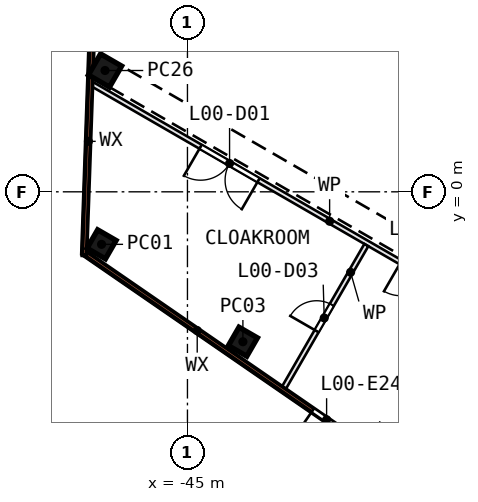
"""IFC4 building model, lengths in metres.
Left out: names, types, materials, properties, quantities, classifications, styles, units other than length and angle.
Written with IfcOpenShell. Run it as: python <this file> out.ifc"""

import sys

from ifc_helpers import new_model, si_unit, direction, frame, frame_2d, origin, origin_2d, place, context, subcontext, project, spatial, rectangle, extrude, element, fill, save


model = new_model("IFC4")
c1 = context("Model", 3, precision=1e-05, world=origin(), true_north=direction((0.0, 1.0)))
c2 = subcontext(c1, "Body", "Model", "MODEL_VIEW")
j1 = project(units=[si_unit("LENGTHUNIT", "METRE"), si_unit("PLANEANGLEUNIT", "RADIAN")], contexts=[c1])
p1 = place(None, origin())
s1 = spatial("IfcSite", under=j1, at=p1, CompositionType="ELEMENT")
p2 = place(p1, origin())
s2 = spatial("IfcBuilding", under=s1, at=p2, CompositionType="ELEMENT")
p3 = place(p2, origin())
s3 = spatial("IfcBuildingStorey", under=s2, at=p3, CompositionType="ELEMENT", Elevation=0.0)
for number, where, z_axis, x_axis in (
    (1, (-47.825, -1.728, 0.0), (0.0, 0.0, 1.0), (-0.866, 0.5, 0.0)),
    (2, (-43.176, -4.931, 0.0), (0.0, 0.0, 1.0), (-0.866, 0.5, 0.0)),
):
    element("IfcColumn", number, at=place(p3, frame(where, z_axis=z_axis, x_axis=x_axis)), inside=s3, PredefinedType="COLUMN", context=c2, shape_type="SweptSolid", body=[
        extrude(rectangle(XDim=0.7, YDim=0.7, at=origin_2d()), origin(), (0.0, 0.0, 1.0), 8.0),
    ])
p4 = place(p3, frame((-47.712, 3.99, 0.0), z_axis=(0.0, 0.0, 1.0), x_axis=(-0.866025404, 0.5, 0.0)))
e3 = element("IfcColumn", 3, at=p4, inside=s3, PredefinedType="COLUMN", context=c2, shape_type="SweptSolid", body=[
    extrude(rectangle(XDim=0.8, YDim=0.8, at=origin_2d()), origin(), (0.0, 0.0, 1.0), 8.0),
])
p5 = place(p3, frame((-48.127, 5.413, 0.0), z_axis=(0.0, 0.0, 1.0), x_axis=(-0.034847415, -0.999392644, 0.0)))
e4 = element("IfcWall", 4, at=p5, inside=s3, PredefinedType="SOLIDWALL", context=c2, shape_type="SweptSolid", body=[
    extrude(rectangle(XDim=7.51, YDim=0.14, at=frame_2d((3.755, 0.0))), origin(), (0.0, 0.0, 1.0), 7.55),
])
p6 = place(p3, frame((-33.989, -11.93, 0.0), z_axis=(0.0, 0.0, 1.0), x_axis=(-0.823449914, 0.567388967, 0.0)))
e5 = element("IfcWall", 5, at=p6, inside=s3, PredefinedType="SOLIDWALL", context=c2, shape_type="SweptSolid", body=[
    extrude(rectangle(XDim=17.4, YDim=0.14, at=frame_2d((8.7, 0.0))), origin(), (0.0, 0.0, 1.0), 7.55),
])
p7 = place(p6, frame((7.264, 0.0, 0.0)))
e6 = element("IfcOpeningElement", 6, at=p7, cuts=e5, PredefinedType="OPENING", context=c2, shape_type="SweptSolid", body=[
    extrude(rectangle(XDim=1.1, YDim=2.4, at=frame_2d((0.55, 1.2))), frame((0.0, 0.08, 0.0), z_axis=(0.0, -1.0, 0.0), x_axis=(1.0, 0.0, 0.0)), (0.0, 0.0, 1.0), 0.16),
])
p8 = place(p6, frame((2.518, 0.0, 0.0)))
e7 = element("IfcOpeningElement", 7, at=p8, cuts=e5, PredefinedType="OPENING", context=c2, shape_type="SweptSolid", body=[
    extrude(rectangle(XDim=1.1, YDim=2.4, at=frame_2d((0.55, 1.2))), frame((0.0, 0.08, 0.0), z_axis=(0.0, -1.0, 0.0), x_axis=(1.0, 0.0, 0.0)), (0.0, 0.0, 1.0), 0.16),
])
p9 = place(p3, frame((-34.814, -4.149, 0.0), z_axis=(0.0, 0.0, 1.0), x_axis=(-0.866027575, 0.499996239, 0.0)))
e8 = element("IfcWall", 8, at=p9, inside=s3, PredefinedType="PARTITIONING", context=c2, shape_type="SweptSolid", body=[
    extrude(rectangle(XDim=15.412, YDim=0.15, at=frame_2d((7.706, 0.0))), origin(), (0.0, 0.0, 1.0), 7.55),
])
p10 = place(p9, frame((9.062, 0.0, 0.0)))
e9 = element("IfcOpeningElement", 9, at=p10, cuts=e8, PredefinedType="OPENING", context=c2, shape_type="SweptSolid", body=[
    extrude(rectangle(XDim=2.2, YDim=2.4, at=frame_2d((1.1, 1.2))), frame((0.0, 0.085, 0.0), z_axis=(0.0, -1.0, 0.0), x_axis=(1.0, 0.0, 0.0)), (0.0, 0.0, 1.0), 0.17),
])
p11 = place(p9, frame((1.462, 0.0, 0.0)))
e10 = element("IfcOpeningElement", 10, at=p11, cuts=e8, PredefinedType="OPENING", context=c2, shape_type="SweptSolid", body=[
    extrude(rectangle(XDim=2.2, YDim=2.4, at=frame_2d((1.1, 1.2))), frame((0.0, 0.085, 0.0), z_axis=(0.0, -1.0, 0.0), x_axis=(1.0, 0.0, 0.0)), (0.0, 0.0, 1.0), 0.17),
])
p12 = place(p3, frame((-41.826, -6.445, 0.0), z_axis=(0.0, 0.0, 1.0), x_axis=(0.50002013, 0.866013781, 0.0)))
e11 = element("IfcWall", 11, at=p12, inside=s3, PredefinedType="PARTITIONING", context=c2, shape_type="SweptSolid", body=[
    extrude(rectangle(XDim=5.419, YDim=0.15, at=frame_2d((2.709, 0.0))), origin(), (0.0, 0.0, 1.0), 7.55),
])
p13 = place(p12, frame((2.15, 0.0, 0.0)))
e12 = element("IfcOpeningElement", 12, at=p13, cuts=e11, PredefinedType="OPENING", context=c2, shape_type="SweptSolid", body=[
    extrude(rectangle(XDim=1.0, YDim=2.1, at=frame_2d((0.5, 1.05))), frame((0.0, 0.085, 0.0), z_axis=(0.0, -1.0, 0.0), x_axis=(1.0, 0.0, 0.0)), (0.0, 0.0, 1.0), 0.17),
])
p14 = place(p7, origin())
e13 = element("IfcDoor", 13, at=p14, inside=s3, OperationType="SINGLE_SWING_RIGHT", PredefinedType="DOOR", context=c2, shape_type="SweptSolid", body=[
    extrude(rectangle(XDim=1.1, YDim=2.4, at=frame_2d((0.55, 1.2))), frame((0.0, 0.025, 0.0), z_axis=(0.0, -1.0, 0.0), x_axis=(1.0, 0.0, 0.0)), (0.0, 0.0, 1.0), 0.05),
])
fill(e6, e13)
p15 = place(p10, origin())
e14 = element("IfcDoor", 14, at=p15, inside=s3, OperationType="DOUBLE_DOOR_SINGLE_SWING", PredefinedType="DOOR", context=c2, shape_type="SweptSolid", body=[
    extrude(rectangle(XDim=2.2, YDim=2.4, at=frame_2d((1.1, 1.2))), frame((0.0, 0.025, 0.0), z_axis=(0.0, -1.0, 0.0), x_axis=(1.0, 0.0, 0.0)), (0.0, 0.0, 1.0), 0.05),
])
fill(e9, e14)
p16 = place(p13, origin())
e15 = element("IfcDoor", 15, at=p16, inside=s3, OperationType="SINGLE_SWING_LEFT", PredefinedType="DOOR", context=c2, shape_type="SweptSolid", body=[
    extrude(rectangle(XDim=1.0, YDim=2.1, at=frame_2d((0.5, 1.05))), frame((0.0, 0.025, 0.0), z_axis=(0.0, -1.0, 0.0), x_axis=(1.0, 0.0, 0.0)), (0.0, 0.0, 1.0), 0.05),
])
fill(e12, e15)
save(model, sys.argv[1])
